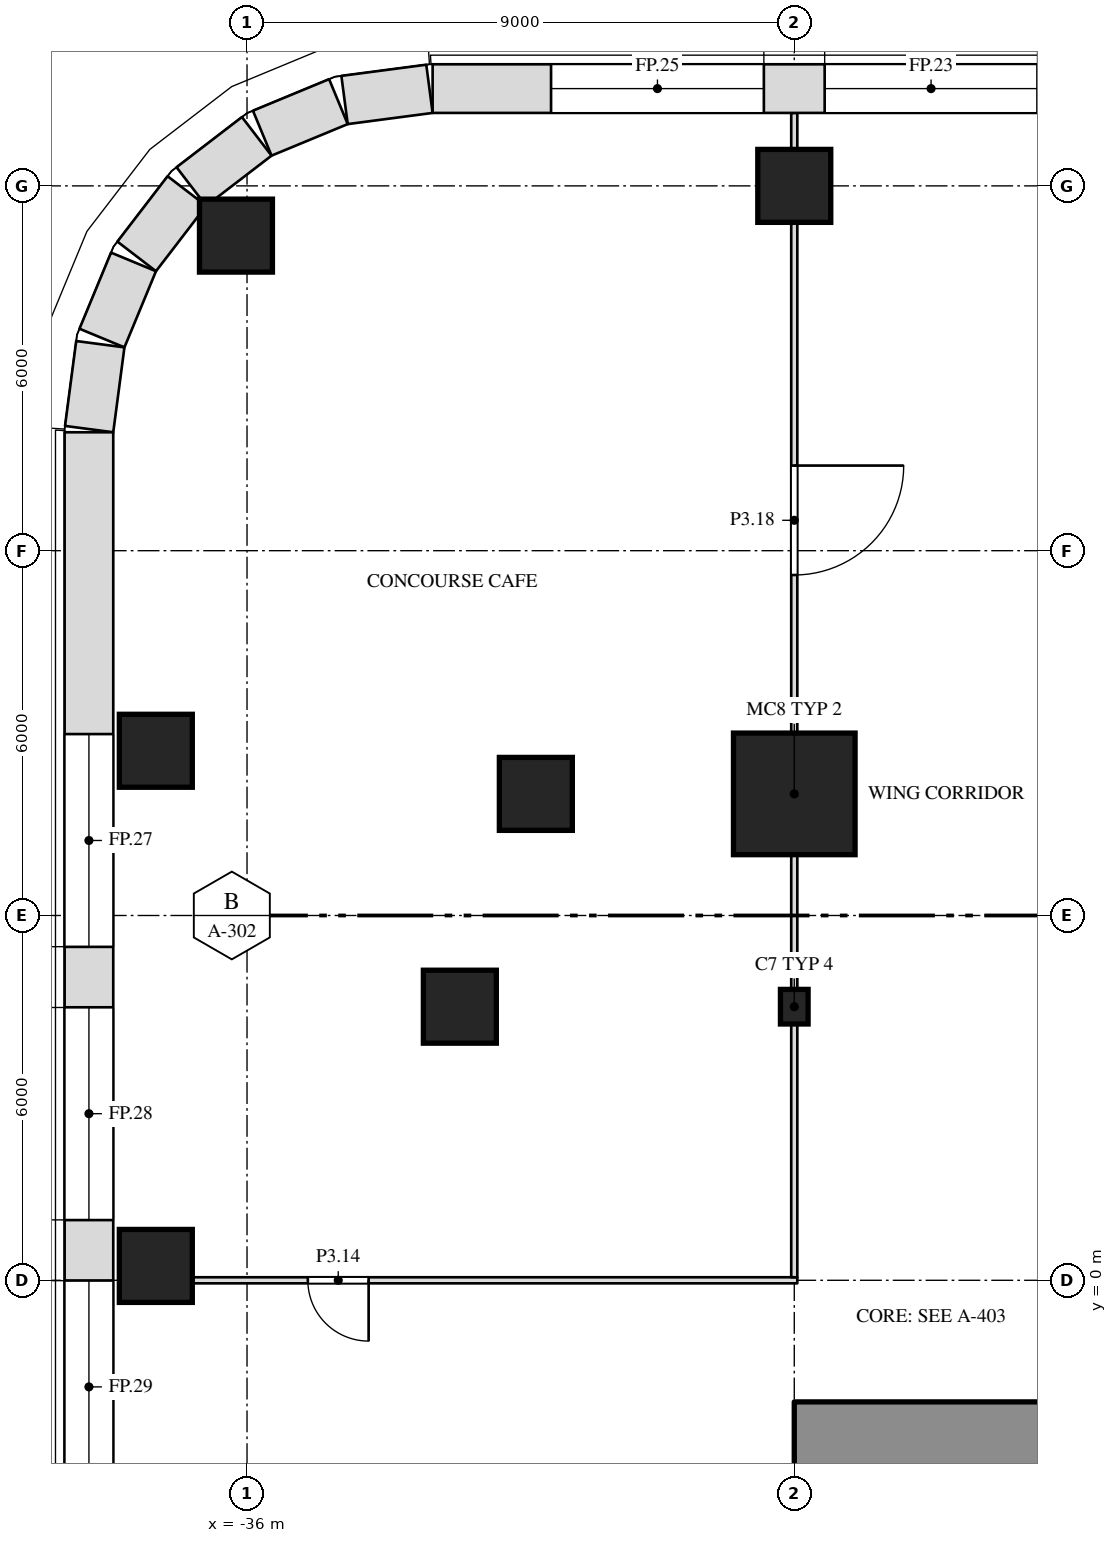
"""IFC4 building model, lengths in metres.
Left out: names, types, materials, properties, quantities, classifications, styles, units other than length and angle.
Written with IfcOpenShell. Run it as: python <this file> out.ifc"""

import sys

from ifc_helpers import new_model, si_unit, direction, frame, frame_2d, origin, origin_2d, place, context, subcontext, project, spatial, rectangle, i_section, extrude, element, fill, save


model = new_model("IFC4")
c1 = context("Model", 3, precision=1e-05, world=origin(), true_north=direction((0.0, 1.0)))
c2 = subcontext(c1, "Body", "Model", "MODEL_VIEW")
j1 = project(units=[si_unit("LENGTHUNIT", "METRE"), si_unit("PLANEANGLEUNIT", "RADIAN")], contexts=[c1])
p1 = place(None, origin())
s1 = spatial("IfcSite", under=j1, at=p1, CompositionType="ELEMENT")
p2 = place(p1, origin())
s2 = spatial("IfcBuilding", under=s1, at=p2, CompositionType="ELEMENT")
p3 = place(p2, frame((0.0, 0.0, 21.0)))
s3 = spatial("IfcBuildingStorey", under=s2, at=p3, CompositionType="ELEMENT", Elevation=21.0)
for number, where, z_axis, x_axis in (
    (1, (-37.5, 0.236, 0.0), (0.0, 0.0, 1.0), (1.0, 0.0, 0.0)),
    (2, (-32.5, 4.5, 0.0), (0.0, 0.0, 1.0), (1.0, 0.0, 0.0)),
):
    element("IfcColumn", number, at=place(p3, frame(where, z_axis=z_axis, x_axis=x_axis)), inside=s3, PredefinedType="COLUMN", context=c2, shape_type="SweptSolid", body=[
        extrude(rectangle(XDim=1.2, YDim=1.2, at=origin_2d()), origin(), (0.0, 0.0, 1.0), 6.0),
    ])
p4 = place(p3, frame((-27.0, 4.5, 0.0), z_axis=(0.0, 0.0, 1.0), x_axis=(1.0, 0.0, 0.0)))
e3 = element("IfcColumn", 3, at=p4, inside=s3, PredefinedType="COLUMN", context=c2, shape_type="SweptSolid", body=[
    extrude(i_section(OverallWidth=0.455, OverallDepth=0.569, WebThickness=0.078, FlangeThickness=0.125, at=origin_2d()), origin(), (0.0, 0.0, 1.0), 6.0),
])
p5 = place(p3, frame((-31.25, 8.0, 0.0), z_axis=(0.0, 0.0, 1.0), x_axis=(1.0, 0.0, 0.0)))
e4 = element("IfcColumn", 4, at=p5, inside=s3, PredefinedType="COLUMN", context=c2, shape_type="SweptSolid", body=[
    extrude(rectangle(XDim=1.2, YDim=1.2, at=origin_2d()), origin(), (0.0, 0.0, 1.0), 6.0),
])
p6 = place(p3, frame((-27.0, 8.0, 0.0), z_axis=(0.0, 0.0, 1.0), x_axis=(1.0, 0.0, 0.0)))
e5 = element("IfcColumn", 5, at=p6, inside=s3, PredefinedType="COLUMN", context=c2, shape_type="SweptSolid", body=[
    extrude(rectangle(XDim=2.0, YDim=2.0, at=origin_2d()), origin(), (0.0, 0.0, 1.0), 6.0),
])
for number, where, z_axis, x_axis in (
    (6, (-37.5, 8.709, 0.0), (0.0, 0.0, 1.0), (1.0, 0.0, 0.0)),
    (7, (-36.182, 17.182, 0.0), (0.0, 0.0, 1.0), (1.0, 0.0, 0.0)),
    (8, (-27.0, 18.0, 0.0), (0.0, 0.0, 1.0), (1.0, 0.0, 0.0)),
):
    element("IfcColumn", number, at=place(p3, frame(where, z_axis=z_axis, x_axis=x_axis)), inside=s3, PredefinedType="COLUMN", context=c2, shape_type="SweptSolid", body=[
        extrude(rectangle(XDim=1.2, YDim=1.2, at=origin_2d()), origin(), (0.0, 0.0, 1.0), 6.0),
    ])
p7 = place(p3, frame((-27.0, -2.6, 0.0), z_axis=(0.0, 0.0, 1.0), x_axis=(1.0, 0.0, 0.0)))
e9 = element("IfcWall", 9, at=p7, inside=s3, PredefinedType="SHEAR", context=c2, shape_type="SweptSolid", body=[
    extrude(rectangle(XDim=54.0, YDim=1.2, at=frame_2d((27.0, 0.0))), origin(), (0.0, 0.0, 1.0), 5.7),
])
p8 = place(p3, frame((-36.9, 0.0, 0.0), z_axis=(0.0, 0.0, 1.0), x_axis=(1.0, 0.0, 0.0)))
e10 = element("IfcWall", 10, at=p8, inside=s3, PredefinedType="PARTITIONING", context=c2, shape_type="SweptSolid", body=[
    extrude(rectangle(XDim=9.95, YDim=0.1, at=frame_2d((4.975, 0.0))), origin(), (0.0, 0.0, 1.0), 5.088),
])
p9 = place(p8, frame((1.9, 0.0, 0.0)))
e11 = element("IfcOpeningElement", 11, at=p9, cuts=e10, PredefinedType="OPENING", context=c2, shape_type="SweptSolid", body=[
    extrude(rectangle(XDim=1.0, YDim=2.1, at=frame_2d((0.5, 1.05))), frame((0.0, 0.062, 0.0), z_axis=(0.0, -1.0, 0.0), x_axis=(1.0, 0.0, 0.0)), (0.0, 0.0, 1.0), 0.124),
])
p10 = place(p3, frame((-27.0, 0.05, 0.0), z_axis=(0.0, 0.0, 1.0), x_axis=(0.0, 1.0, 0.0)))
e12 = element("IfcWall", 12, at=p10, inside=s3, PredefinedType="PARTITIONING", context=c2, shape_type="SweptSolid", body=[
    extrude(rectangle(XDim=4.166, YDim=0.1, at=frame_2d((2.083, 0.0))), origin(), (0.0, 0.0, 1.0), 5.088),
])
p11 = place(p3, frame((-27.0, 4.784, 0.0), z_axis=(0.0, 0.0, 1.0), x_axis=(0.0, 1.0, 0.0)))
e13 = element("IfcWall", 13, at=p11, inside=s3, PredefinedType="PARTITIONING", context=c2, shape_type="SweptSolid", body=[
    extrude(rectangle(XDim=2.216, YDim=0.1, at=frame_2d((1.108, 0.0))), origin(), (0.0, 0.0, 1.0), 5.088),
])
p12 = place(p3, frame((-27.0, 9.0, 0.0), z_axis=(0.0, 0.0, 1.0), x_axis=(0.0, 1.0, 0.0)))
e14 = element("IfcWall", 14, at=p12, inside=s3, PredefinedType="PARTITIONING", context=c2, shape_type="SweptSolid", body=[
    extrude(rectangle(XDim=8.4, YDim=0.1, at=frame_2d((4.2, 0.0))), origin(), (0.0, 0.0, 1.0), 5.088),
])
p13 = place(p12, frame((2.6, 0.0, 0.0)))
e15 = element("IfcOpeningElement", 15, at=p13, cuts=e14, PredefinedType="OPENING", context=c2, shape_type="SweptSolid", body=[
    extrude(rectangle(XDim=1.8, YDim=2.1, at=frame_2d((0.9, 1.05))), frame((0.0, 0.062, 0.0), z_axis=(0.0, -1.0, 0.0), x_axis=(1.0, 0.0, 0.0)), (0.0, 0.0, 1.0), 0.124),
])
p14 = place(p3, frame((-27.0, 18.6, 0.0), z_axis=(0.0, 0.0, 1.0), x_axis=(0.0, 1.0, 0.0)))
e16 = element("IfcWall", 16, at=p14, inside=s3, PredefinedType="PARTITIONING", context=c2, shape_type="SweptSolid", body=[
    extrude(rectangle(XDim=0.6, YDim=0.1, at=frame_2d((0.3, 0.0))), origin(), (0.0, 0.0, 1.0), 5.7),
])
p15 = place(p3, frame((-18.0, 19.6, 0.0), z_axis=(0.0, 0.0, 1.0), x_axis=(-1.0, 0.0, 0.0)))
e17 = element("IfcWall", 17, at=p15, inside=s3, PredefinedType="SOLIDWALL", context=c2, shape_type="SweptSolid", body=[
    extrude(rectangle(XDim=14.948, YDim=0.8, at=frame_2d((7.474, 0.0))), origin(), (0.0, 0.0, 1.0), 5.7),
])
p16 = place(p15, frame((0.5, 0.0, 1.0)))
e18 = element("IfcOpeningElement", 18, at=p16, cuts=e17, PredefinedType="OPENING", context=c2, shape_type="SweptSolid", body=[
    extrude(rectangle(XDim=3.5, YDim=4.0, at=frame_2d((1.75, 2.0))), frame((0.0, 0.412, 0.0), z_axis=(0.0, -1.0, 0.0), x_axis=(1.0, 0.0, 0.0)), (0.0, 0.0, 1.0), 0.824),
])
p17 = place(p15, frame((5.0, 0.0, 1.0)))
e19 = element("IfcOpeningElement", 19, at=p17, cuts=e17, PredefinedType="OPENING", context=c2, shape_type="SweptSolid", body=[
    extrude(rectangle(XDim=3.5, YDim=4.0, at=frame_2d((1.75, 2.0))), frame((0.0, 0.412, 0.0), z_axis=(0.0, -1.0, 0.0), x_axis=(1.0, 0.0, 0.0)), (0.0, 0.0, 1.0), 0.824),
])
p18 = place(p15, frame((9.5, 0.0, 1.0)))
e20 = element("IfcOpeningElement", 20, at=p18, cuts=e17, PredefinedType="OPENING", context=c2, shape_type="SweptSolid", body=[
    extrude(rectangle(XDim=3.5, YDim=4.0, at=frame_2d((1.75, 2.0))), frame((0.0, 0.412, 0.0), z_axis=(0.0, -1.0, 0.0), x_axis=(1.0, 0.0, 0.0)), (0.0, 0.0, 1.0), 0.824),
])
p19 = place(p3, frame((-33.0, 19.597, 0.0), z_axis=(0.0, 0.0, 1.0), x_axis=(-0.99144603414, -0.130517283865, 0.0)))
e21 = element("IfcWall", 21, at=p19, inside=s3, PredefinedType="SOLIDWALL", context=c2, shape_type="SweptSolid", body=[
    extrude(rectangle(XDim=1.408, YDim=0.8, at=frame_2d((0.704, 0.0))), origin(), (0.0, 0.0, 1.0), 5.7),
])
p20 = place(p3, frame((-34.497, 19.386, 0.0), z_axis=(0.0, 0.0, 1.0), x_axis=(-0.923847774587, -0.38276009378, 0.0)))
e22 = element("IfcWall", 22, at=p20, inside=s3, PredefinedType="SOLIDWALL", context=c2, shape_type="SweptSolid", body=[
    extrude(rectangle(XDim=1.355, YDim=0.8, at=frame_2d((0.678, 0.0))), origin(), (0.0, 0.0, 1.0), 5.7),
])
for number, where, z_axis, x_axis in (
    (23, (-35.84, 18.815, 0.0), (0.0, 0.0, 1.0), (-0.793, -0.609, 0.0)),
    (24, (-36.989, 17.916, 0.0), (0.0, 0.0, 1.0), (-0.609, -0.793, 0.0)),
):
    element("IfcWall", number, at=place(p3, frame(where, z_axis=z_axis, x_axis=x_axis)), inside=s3, PredefinedType="SOLIDWALL", context=c2, shape_type="SweptSolid", body=[
        extrude(rectangle(XDim=1.356, YDim=0.8, at=frame_2d((0.678, 0.0))), origin(), (0.0, 0.0, 1.0), 5.7),
    ])
p21 = place(p3, frame((-37.867, 16.75, 0.0), z_axis=(0.0, 0.0, 1.0), x_axis=(-0.38276009378, -0.923847774587, 0.0)))
e25 = element("IfcWall", 25, at=p21, inside=s3, PredefinedType="SOLIDWALL", context=c2, shape_type="SweptSolid", body=[
    extrude(rectangle(XDim=1.355, YDim=0.8, at=frame_2d((0.678, 0.0))), origin(), (0.0, 0.0, 1.0), 5.7),
])
p22 = place(p3, frame((-38.413, 15.396, 0.0), z_axis=(0.0, 0.0, 1.0), x_axis=(-0.130517283865, -0.99144603414, 0.0)))
e26 = element("IfcWall", 26, at=p22, inside=s3, PredefinedType="SOLIDWALL", context=c2, shape_type="SweptSolid", body=[
    extrude(rectangle(XDim=1.408, YDim=0.8, at=frame_2d((0.704, 0.0))), origin(), (0.0, 0.0, 1.0), 5.7),
])
p23 = place(p3, frame((-38.6, 13.948, 0.0), z_axis=(0.0, 0.0, 1.0), x_axis=(0.0, -1.0, 0.0)))
e27 = element("IfcWall", 27, at=p23, inside=s3, PredefinedType="SOLIDWALL", context=c2, shape_type="SweptSolid", body=[
    extrude(rectangle(XDim=35.895, YDim=0.8, at=frame_2d((17.948, 0.0))), origin(), (0.0, 0.0, 1.0), 5.7),
])
p24 = place(p23, frame((4.964, 0.0, 1.0)))
e28 = element("IfcOpeningElement", 28, at=p24, cuts=e27, PredefinedType="OPENING", context=c2, shape_type="SweptSolid", body=[
    extrude(rectangle(XDim=3.5, YDim=4.0, at=frame_2d((1.75, 2.0))), frame((0.0, 0.412, 0.0), z_axis=(0.0, -1.0, 0.0), x_axis=(1.0, 0.0, 0.0)), (0.0, 0.0, 1.0), 0.824),
])
p25 = place(p23, frame((9.458, 0.0, 1.0)))
e29 = element("IfcOpeningElement", 29, at=p25, cuts=e27, PredefinedType="OPENING", context=c2, shape_type="SweptSolid", body=[
    extrude(rectangle(XDim=3.5, YDim=4.0, at=frame_2d((1.75, 2.0))), frame((0.0, 0.412, 0.0), z_axis=(0.0, -1.0, 0.0), x_axis=(1.0, 0.0, 0.0)), (0.0, 0.0, 1.0), 0.824),
])
p26 = place(p23, frame((13.951, 0.0, 1.0)))
e30 = element("IfcOpeningElement", 30, at=p26, cuts=e27, PredefinedType="OPENING", context=c2, shape_type="SweptSolid", body=[
    extrude(rectangle(XDim=3.5, YDim=4.0, at=frame_2d((1.75, 2.0))), frame((0.0, 0.412, 0.0), z_axis=(0.0, -1.0, 0.0), x_axis=(1.0, 0.0, 0.0)), (0.0, 0.0, 1.0), 0.824),
])
p27 = place(p23, frame((18.444, 0.0, 1.0)))
e31 = element("IfcOpeningElement", 31, at=p27, cuts=e27, PredefinedType="OPENING", context=c2, shape_type="SweptSolid", body=[
    extrude(rectangle(XDim=3.5, YDim=4.0, at=frame_2d((1.75, 2.0))), frame((0.0, 0.412, 0.0), z_axis=(0.0, -1.0, 0.0), x_axis=(1.0, 0.0, 0.0)), (0.0, 0.0, 1.0), 0.824),
])
p28 = place(p23, frame((22.938, 0.0, 1.0)))
e32 = element("IfcOpeningElement", 32, at=p28, cuts=e27, PredefinedType="OPENING", context=c2, shape_type="SweptSolid", body=[
    extrude(rectangle(XDim=3.5, YDim=4.0, at=frame_2d((1.75, 2.0))), frame((0.0, 0.412, 0.0), z_axis=(0.0, -1.0, 0.0), x_axis=(1.0, 0.0, 0.0)), (0.0, 0.0, 1.0), 0.824),
])
p29 = place(p23, frame((27.431, 0.0, 1.0)))
e33 = element("IfcOpeningElement", 33, at=p29, cuts=e27, PredefinedType="OPENING", context=c2, shape_type="SweptSolid", body=[
    extrude(rectangle(XDim=3.5, YDim=4.0, at=frame_2d((1.75, 2.0))), frame((0.0, 0.412, 0.0), z_axis=(0.0, -1.0, 0.0), x_axis=(1.0, 0.0, 0.0)), (0.0, 0.0, 1.0), 0.824),
])
p30 = place(p9, origin())
e34 = element("IfcDoor", 34, at=p30, inside=s3, OperationType="SINGLE_SWING_LEFT", PredefinedType="DOOR", context=c2, shape_type="SweptSolid", body=[
    extrude(rectangle(XDim=1.0, YDim=2.1, at=frame_2d((0.5, 1.05))), frame((0.0, 0.025, 0.0), z_axis=(0.0, -1.0, 0.0), x_axis=(1.0, 0.0, 0.0)), (0.0, 0.0, 1.0), 0.05),
])
fill(e11, e34)
p31 = place(p13, origin())
e35 = element("IfcDoor", 35, at=p31, inside=s3, OperationType="DOUBLE_DOOR_SINGLE_SWING", PredefinedType="DOOR", context=c2, shape_type="SweptSolid", body=[
    extrude(rectangle(XDim=1.8, YDim=2.1, at=frame_2d((0.9, 1.05))), frame((0.0, 0.025, 0.0), z_axis=(0.0, -1.0, 0.0), x_axis=(1.0, 0.0, 0.0)), (0.0, 0.0, 1.0), 0.05),
])
fill(e15, e35)
p32 = place(p17, origin())
e36 = element("IfcWindow", 36, at=p32, inside=s3, PartitioningType="SINGLE_PANEL", PredefinedType="WINDOW", context=c2, shape_type="SweptSolid", body=[
    extrude(rectangle(XDim=3.5, YDim=4.0, at=frame_2d((1.75, 2.0))), frame((0.0, 0.03, 0.0), z_axis=(0.0, -1.0, 0.0), x_axis=(1.0, 0.0, 0.0)), (0.0, 0.0, 1.0), 0.06),
])
fill(e19, e36)
p33 = place(p18, origin())
e37 = element("IfcWindow", 37, at=p33, inside=s3, PartitioningType="SINGLE_PANEL", PredefinedType="WINDOW", context=c2, shape_type="SweptSolid", body=[
    extrude(rectangle(XDim=3.5, YDim=4.0, at=frame_2d((1.75, 2.0))), frame((0.0, 0.03, 0.0), z_axis=(0.0, -1.0, 0.0), x_axis=(1.0, 0.0, 0.0)), (0.0, 0.0, 1.0), 0.06),
])
fill(e20, e37)
p34 = place(p24, origin())
e38 = element("IfcWindow", 38, at=p34, inside=s3, PartitioningType="SINGLE_PANEL", PredefinedType="WINDOW", context=c2, shape_type="SweptSolid", body=[
    extrude(rectangle(XDim=3.5, YDim=4.0, at=frame_2d((1.75, 2.0))), frame((0.0, 0.03, 0.0), z_axis=(0.0, -1.0, 0.0), x_axis=(1.0, 0.0, 0.0)), (0.0, 0.0, 1.0), 0.06),
])
fill(e28, e38)
p35 = place(p25, origin())
e39 = element("IfcWindow", 39, at=p35, inside=s3, PartitioningType="SINGLE_PANEL", PredefinedType="WINDOW", context=c2, shape_type="SweptSolid", body=[
    extrude(rectangle(XDim=3.5, YDim=4.0, at=frame_2d((1.75, 2.0))), frame((0.0, 0.03, 0.0), z_axis=(0.0, -1.0, 0.0), x_axis=(1.0, 0.0, 0.0)), (0.0, 0.0, 1.0), 0.06),
])
fill(e29, e39)
p36 = place(p26, origin())
e40 = element("IfcWindow", 40, at=p36, inside=s3, PartitioningType="SINGLE_PANEL", PredefinedType="WINDOW", context=c2, shape_type="SweptSolid", body=[
    extrude(rectangle(XDim=3.5, YDim=4.0, at=frame_2d((1.75, 2.0))), frame((0.0, 0.03, 0.0), z_axis=(0.0, -1.0, 0.0), x_axis=(1.0, 0.0, 0.0)), (0.0, 0.0, 1.0), 0.06),
])
fill(e30, e40)
save(model, sys.argv[1])
